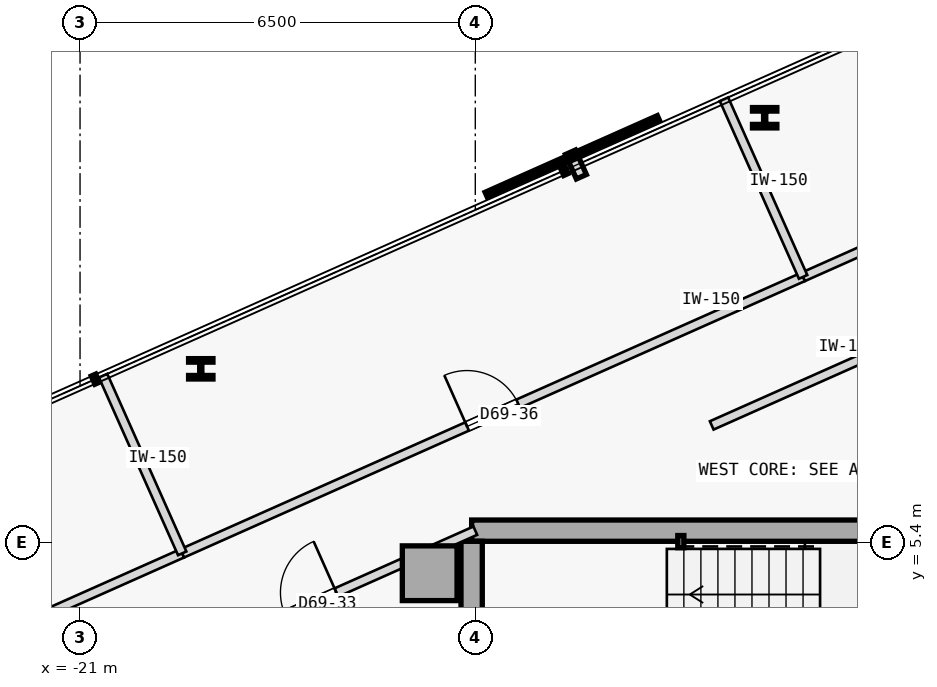
"""IFC4 building model, lengths in metres.
Left out: names, types, materials, properties, quantities, classifications, styles, units other than length and angle.
Written with IfcOpenShell. Run it as: python <this file> out.ifc"""

import sys

from ifc_helpers import new_model, si_unit, direction, frame, frame_2d, origin, origin_2d, place, context, subcontext, project, spatial, rectangle, hollow_rectangle, i_section, extrude, element, fill, save


model = new_model("IFC4")
c1 = context("Model", 3, precision=1e-05, world=origin(), true_north=direction((0.0, 1.0)))
c2 = subcontext(c1, "Body", "Model", "MODEL_VIEW")
j1 = project(units=[si_unit("LENGTHUNIT", "METRE"), si_unit("PLANEANGLEUNIT", "RADIAN")], contexts=[c1])
p1 = place(None, origin())
s1 = spatial("IfcSite", under=j1, at=p1, CompositionType="ELEMENT")
p2 = place(p1, origin())
s2 = spatial("IfcBuilding", under=s1, at=p2, CompositionType="ELEMENT")
p3 = place(p2, frame((0.0, 0.0, 258.85)))
s3 = spatial("IfcBuildingStorey", under=s2, at=p3, CompositionType="ELEMENT", Elevation=258.85)
p4 = place(p3, frame((-15.25, 4.9, 0.0), z_axis=(0.0, 0.0, 1.0), x_axis=(1.0, 0.0, 0.0)))
e1 = element("IfcColumn", 1, at=p4, inside=s3, PredefinedType="COLUMN", context=c2, shape_type="SweptSolid", body=[
    extrude(rectangle(XDim=0.9, YDim=0.9, at=origin_2d()), origin(), (0.0, 0.0, 1.0), 3.35),
])
p5 = place(p3, frame((-14.56, 5.6, 0.0), z_axis=(0.0, 0.0, 1.0), x_axis=(1.0, 0.0, 0.0)))
e2 = element("IfcWall", 2, at=p5, inside=s3, PredefinedType="SHEAR", context=c2, shape_type="SweptSolid", body=[
    extrude(rectangle(XDim=11.41, YDim=0.35, at=frame_2d((5.705, 0.0))), origin(), (0.0, 0.0, 1.0), 3.125),
])
p6 = place(p3, frame((-14.56, -5.425, 0.0), z_axis=(0.0, 0.0, 1.0), x_axis=(0.0, 1.0, 0.0)))
e3 = element("IfcWall", 3, at=p6, inside=s3, PredefinedType="SHEAR", context=c2, shape_type="SweptSolid", body=[
    extrude(rectangle(XDim=10.85, YDim=0.35, at=frame_2d((5.425, 0.0))), origin(), (0.0, 0.0, 1.0), 3.125),
])
p7 = place(p3, frame((-11.12, 5.42, 0.0), z_axis=(0.0, 0.0, 1.0), x_axis=(1.0, 0.0, 0.0)))
e4 = element("IfcColumn", 4, at=p7, inside=s3, PredefinedType="COLUMN", context=c2, shape_type="SweptSolid", body=[
    extrude(hollow_rectangle(XDim=0.1, YDim=0.2, WallThickness=0.008, at=origin_2d()), origin(), (0.0, 0.0, 1.0), 3.35),
])
for number, where, z_axis, x_axis in (
    (5, (-9.741, 12.39, 0.0), (0.0, 0.0, 1.0), (1.0, 0.0, 0.0)),
    (6, (-19.015, 8.262, 0.0), (0.0, 0.0, 1.0), (1.0, 0.0, 0.0)),
):
    element("IfcColumn", number, at=place(p3, frame(where, z_axis=z_axis, x_axis=x_axis)), inside=s3, PredefinedType="COLUMN", context=c2, shape_type="SweptSolid", body=[
        extrude(i_section(OverallWidth=0.401, OverallDepth=0.335, WebThickness=0.036, FlangeThickness=0.058, FilletRadius=0.015, at=origin_2d()), origin(), (0.0, 0.0, 1.0), 3.35),
    ])
p8 = place(p3, frame((-26.126, 2.197, 0.0), z_axis=(0.0, 0.0, 1.0), x_axis=(0.913553251328, 0.40671913772, 0.0)))
e7 = element("IfcWall", 7, at=p8, inside=s3, PredefinedType="PARTITIONING", context=c2, shape_type="SweptSolid", body=[
    extrude(rectangle(XDim=7.45, YDim=0.15, at=frame_2d((3.725, 0.0))), origin(), (0.0, 0.0, 1.0), 3.125),
])
p9 = place(p8, frame((3.265, 0.0, 0.0)))
e8 = element("IfcOpeningElement", 8, at=p9, cuts=e7, PredefinedType="OPENING", context=c2, shape_type="SweptSolid", body=[
    extrude(rectangle(XDim=0.92, YDim=2.15, at=frame_2d((0.46, 1.075))), frame((0.0, 0.085, 0.0), z_axis=(0.0, -1.0, 0.0), x_axis=(1.0, 0.0, 0.0)), (0.0, 0.0, 1.0), 0.17),
])
p10 = place(p3, frame((-18.661, 3.747, 0.0), z_axis=(0.0, 0.0, 1.0), x_axis=(0.913535055583, 0.40676000568, 0.0)))
e9 = element("IfcWall", 9, at=p10, inside=s3, PredefinedType="PARTITIONING", context=c2, shape_type="SweptSolid", body=[
    extrude(rectangle(XDim=4.555, YDim=0.15, at=frame_2d((2.277, 0.0))), origin(), (0.0, 0.0, 1.0), 3.125),
])
p11 = place(p10, frame((1.134, 0.0, 0.0)))
e10 = element("IfcOpeningElement", 10, at=p11, cuts=e9, PredefinedType="OPENING", context=c2, shape_type="SweptSolid", body=[
    extrude(rectangle(XDim=0.92, YDim=2.15, at=frame_2d((0.46, 1.075))), frame((0.0, 0.085, 0.0), z_axis=(0.0, -1.0, 0.0), x_axis=(1.0, 0.0, 0.0)), (0.0, 0.0, 1.0), 0.17),
])
p12 = place(p3, frame((-10.612, 7.331, 0.0), z_axis=(0.0, 0.0, 1.0), x_axis=(0.913543890665, 0.406740162546, 0.0)))
e11 = element("IfcWall", 11, at=p12, inside=s3, PredefinedType="PARTITIONING", context=c2, shape_type="SweptSolid", body=[
    extrude(rectangle(XDim=7.566, YDim=0.15, at=frame_2d((3.783, 0.0))), origin(), (0.0, 0.0, 1.0), 3.125),
])
p13 = place(p12, frame((3.323, 0.0, 0.0)))
e12 = element("IfcOpeningElement", 12, at=p13, cuts=e11, PredefinedType="OPENING", context=c2, shape_type="SweptSolid", body=[
    extrude(rectangle(XDim=0.92, YDim=2.15, at=frame_2d((0.46, 1.075))), frame((0.0, 0.085, 0.0), z_axis=(0.0, -1.0, 0.0), x_axis=(1.0, 0.0, 0.0)), (0.0, 0.0, 1.0), 0.17),
])
p14 = place(p3, frame((-19.32, 5.227, 0.0), z_axis=(0.0, 0.0, 1.0), x_axis=(0.913543828741, 0.406740301628, 0.0)))
e13 = element("IfcWall", 13, at=p14, inside=s3, PredefinedType="PARTITIONING", context=c2, shape_type="SweptSolid", body=[
    extrude(rectangle(XDim=11.177, YDim=0.15, at=frame_2d((5.588, 0.0))), origin(), (0.0, 0.0, 1.0), 3.125),
])
p15 = place(p14, frame((5.128, 0.0, 0.0)))
e14 = element("IfcOpeningElement", 14, at=p15, cuts=e13, PredefinedType="OPENING", context=c2, shape_type="SweptSolid", body=[
    extrude(rectangle(XDim=0.92, YDim=2.15, at=frame_2d((0.46, 1.075))), frame((0.0, 0.085, 0.0), z_axis=(0.0, -1.0, 0.0), x_axis=(1.0, 0.0, 0.0)), (0.0, 0.0, 1.0), 0.17),
])
p16 = place(p3, frame((-9.109, 9.773, 0.0), z_axis=(0.0, 0.0, 1.0), x_axis=(0.913545361298, 0.406736859469, 0.0)))
e15 = element("IfcWall", 15, at=p16, inside=s3, PredefinedType="PARTITIONING", context=c2, shape_type="SweptSolid", body=[
    extrude(rectangle(XDim=19.871, YDim=0.15, at=frame_2d((9.936, 0.0))), origin(), (0.0, 0.0, 1.0), 3.125),
])
p17 = place(p16, frame((9.476, 0.0, 0.0)))
e16 = element("IfcOpeningElement", 16, at=p17, cuts=e15, PredefinedType="OPENING", context=c2, shape_type="SweptSolid", body=[
    extrude(rectangle(XDim=0.92, YDim=2.15, at=frame_2d((0.46, 1.075))), frame((0.0, 0.085, 0.0), z_axis=(0.0, -1.0, 0.0), x_axis=(1.0, 0.0, 0.0)), (0.0, 0.0, 1.0), 0.17),
])
p18 = place(p3, frame((-19.32, 5.227, 0.0), z_axis=(0.0, 0.0, 1.0), x_axis=(-0.406669637818, 0.913575287361, 0.0)))
e17 = element("IfcWall", 17, at=p18, inside=s3, PredefinedType="PARTITIONING", context=c2, shape_type="SweptSolid", body=[
    extrude(rectangle(XDim=3.198, YDim=0.15, at=frame_2d((1.599, 0.0))), origin(), (0.0, 0.0, 1.0), 3.125),
])
p19 = place(p3, frame((-9.109, 9.773, 0.0), z_axis=(0.0, 0.0, 1.0), x_axis=(-0.406698002142, 0.913562660716, 0.0)))
e18 = element("IfcWall", 18, at=p19, inside=s3, PredefinedType="PARTITIONING", context=c2, shape_type="SweptSolid", body=[
    extrude(rectangle(XDim=3.198, YDim=0.15, at=frame_2d((1.599, 0.0))), origin(), (0.0, 0.0, 1.0), 3.125),
])
p20 = place(p11, origin())
e19 = element("IfcDoor", 19, at=p20, inside=s3, OperationType="SINGLE_SWING_RIGHT", PredefinedType="DOOR", context=c2, shape_type="SweptSolid", body=[
    extrude(rectangle(XDim=0.92, YDim=2.15, at=frame_2d((0.46, 1.075))), frame((0.0, 0.025, 0.0), z_axis=(0.0, -1.0, 0.0), x_axis=(1.0, 0.0, 0.0)), (0.0, 0.0, 1.0), 0.05),
])
fill(e10, e19)
p21 = place(p15, origin())
e20 = element("IfcDoor", 20, at=p21, inside=s3, OperationType="SINGLE_SWING_LEFT", PredefinedType="DOOR", context=c2, shape_type="SweptSolid", body=[
    extrude(rectangle(XDim=0.92, YDim=2.15, at=frame_2d((0.46, 1.075))), frame((0.0, 0.025, 0.0), z_axis=(0.0, -1.0, 0.0), x_axis=(1.0, 0.0, 0.0)), (0.0, 0.0, 1.0), 0.05),
])
fill(e14, e20)
save(model, sys.argv[1])
